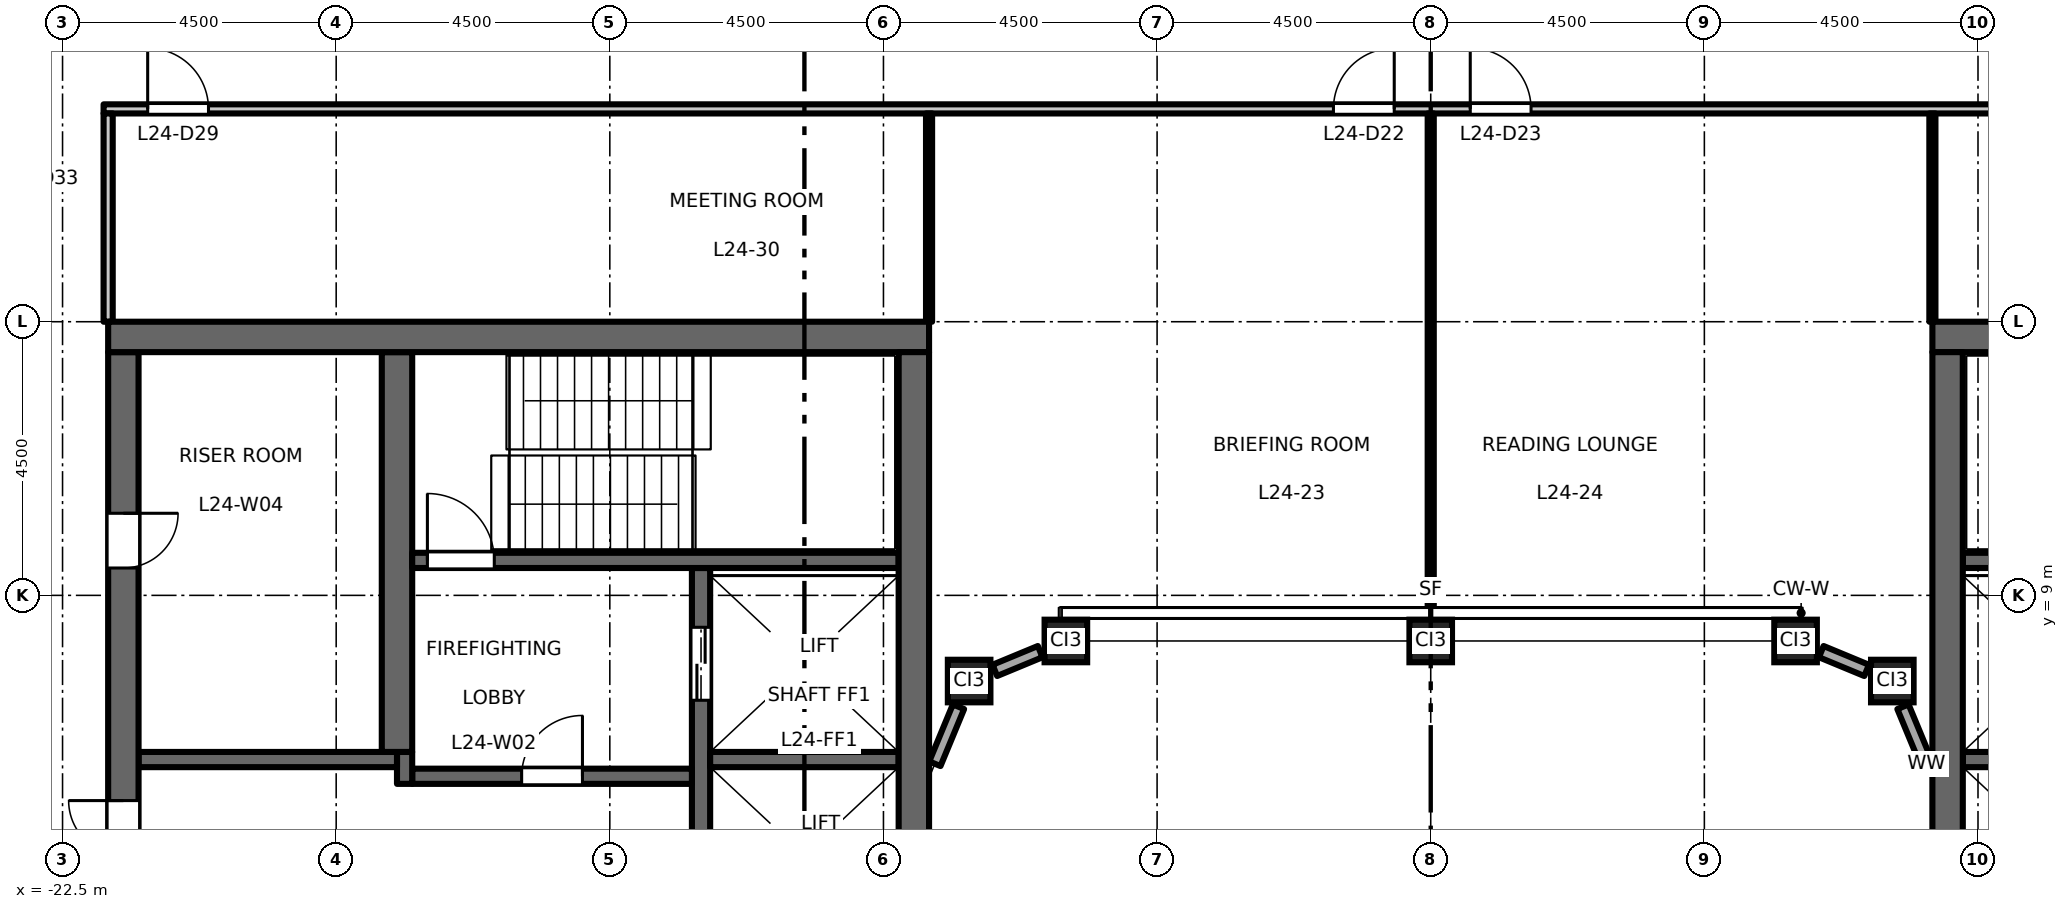
"""IFC4 building model, lengths in metres.
Left out: names, types, materials, properties, quantities, classifications, styles, units other than length and angle.
Written with IfcOpenShell. Run it as: python <this file> out.ifc"""

import sys

from ifc_helpers import new_model, si_unit, direction, frame, frame_2d, origin, origin_2d, place, context, subcontext, project, spatial, rectangle, hollow_rectangle, extrude, element, fill, save


model = new_model("IFC4")
c1 = context("Model", 3, precision=1e-05, world=origin(), true_north=direction((0.0, 1.0)))
c2 = subcontext(c1, "Body", "Model", "MODEL_VIEW")
j1 = project(units=[si_unit("LENGTHUNIT", "METRE"), si_unit("PLANEANGLEUNIT", "RADIAN")], contexts=[c1])
p1 = place(None, origin())
s1 = spatial("IfcSite", under=j1, at=p1, CompositionType="ELEMENT")
p2 = place(p1, origin())
s2 = spatial("IfcBuilding", under=s1, at=p2, CompositionType="ELEMENT")
p3 = place(p2, frame((0.0, 0.0, 113.7)))
s3 = spatial("IfcBuildingStorey", under=s2, at=p3, CompositionType="ELEMENT", Elevation=113.7)
for number, where, z_axis, x_axis in (
    (1, (-7.591, 7.591, 0.0), (0.0, 0.0, 1.0), (1.0, 0.0, 0.0)),
    (2, (-6.0, 8.25, 0.0), (0.0, 0.0, 1.0), (1.0, 0.0, 0.0)),
    (3, (0.0, 8.25, 0.0), (0.0, 0.0, 1.0), (1.0, 0.0, 0.0)),
    (4, (6.0, 8.25, 0.0), (0.0, 0.0, 1.0), (1.0, 0.0, 0.0)),
    (5, (7.591, 7.591, 0.0), (0.0, 0.0, 1.0), (1.0, 0.0, 0.0)),
):
    element("IfcColumn", number, at=place(p3, frame(where, z_axis=z_axis, x_axis=x_axis)), inside=s3, PredefinedType="COLUMN", context=c2, shape_type="SweptSolid", body=[
        extrude(hollow_rectangle(XDim=0.7, YDim=0.7, WallThickness=0.04, at=origin_2d()), origin(), (0.0, 0.0, 1.0), 4.5),
    ])
p4 = place(p3, frame((-12.0, -9.45, 0.0), z_axis=(0.0, 0.0, 1.0), x_axis=(0.0, 1.0, 0.0)))
e6 = element("IfcWall", 6, at=p4, inside=s3, PredefinedType="SHEAR", context=c2, shape_type="SweptSolid", body=[
    extrude(rectangle(XDim=18.9, YDim=0.3, at=frame_2d((9.45, 0.0))), origin(), (0.0, 0.0, 1.0), 4.35),
])
p5 = place(p4, frame((3.625, 0.0, 0.0)))
e7 = element("IfcOpeningElement", 7, at=p5, cuts=e6, PredefinedType="OPENING", context=c2, shape_type="SweptSolid", body=[
    extrude(rectangle(XDim=1.1, YDim=2.1, at=frame_2d((0.55, 1.05))), frame((0.0, 0.16, 0.0), z_axis=(0.0, -1.0, 0.0), x_axis=(1.0, 0.0, 0.0)), (0.0, 0.0, 1.0), 0.32),
])
p6 = place(p4, frame((6.775, 0.0, 0.0)))
e8 = element("IfcOpeningElement", 8, at=p6, cuts=e6, PredefinedType="OPENING", context=c2, shape_type="SweptSolid", body=[
    extrude(rectangle(XDim=1.1, YDim=2.1, at=frame_2d((0.55, 1.05))), frame((0.0, 0.16, 0.0), z_axis=(0.0, -1.0, 0.0), x_axis=(1.0, 0.0, 0.0)), (0.0, 0.0, 1.0), 0.32),
])
p7 = place(p4, frame((9.925, 0.0, 0.0)))
e9 = element("IfcOpeningElement", 9, at=p7, cuts=e6, PredefinedType="OPENING", context=c2, shape_type="SweptSolid", body=[
    extrude(rectangle(XDim=1.1, YDim=2.1, at=frame_2d((0.55, 1.05))), frame((0.0, 0.16, 0.0), z_axis=(0.0, -1.0, 0.0), x_axis=(1.0, 0.0, 0.0)), (0.0, 0.0, 1.0), 0.32),
])
p8 = place(p4, frame((13.075, 0.0, 0.0)))
e10 = element("IfcOpeningElement", 10, at=p8, cuts=e6, PredefinedType="OPENING", context=c2, shape_type="SweptSolid", body=[
    extrude(rectangle(XDim=1.1, YDim=2.1, at=frame_2d((0.55, 1.05))), frame((0.0, 0.16, 0.0), z_axis=(0.0, -1.0, 0.0), x_axis=(1.0, 0.0, 0.0)), (0.0, 0.0, 1.0), 0.32),
])
p9 = place(p4, frame((16.725, 0.0, 0.0)))
e11 = element("IfcOpeningElement", 11, at=p9, cuts=e6, PredefinedType="OPENING", context=c2, shape_type="SweptSolid", body=[
    extrude(rectangle(XDim=1.2, YDim=2.1, at=frame_2d((0.6, 1.05))), frame((0.0, 0.16, 0.0), z_axis=(0.0, -1.0, 0.0), x_axis=(1.0, 0.0, 0.0)), (0.0, 0.0, 1.0), 0.32),
])
p10 = place(p4, frame((0.975, 0.0, 0.0)))
e12 = element("IfcOpeningElement", 12, at=p10, cuts=e6, PredefinedType="OPENING", context=c2, shape_type="SweptSolid", body=[
    extrude(rectangle(XDim=1.2, YDim=2.1, at=frame_2d((0.6, 1.05))), frame((0.0, 0.16, 0.0), z_axis=(0.0, -1.0, 0.0), x_axis=(1.0, 0.0, 0.0)), (0.0, 0.0, 1.0), 0.32),
])
p11 = place(p3, frame((-12.15, 6.025, 0.0), z_axis=(0.0, 0.0, 1.0), x_axis=(-1.0, 0.0, 0.0)))
e13 = element("IfcWall", 13, at=p11, inside=s3, PredefinedType="SHEAR", context=c2, shape_type="SweptSolid", body=[
    extrude(rectangle(XDim=4.6, YDim=0.25, at=frame_2d((2.3, 0.0))), origin(), (0.0, 0.0, 1.0), 4.35),
])
p12 = place(p11, frame((1.8, 0.0, 0.0)))
e14 = element("IfcOpeningElement", 14, at=p12, cuts=e13, PredefinedType="OPENING", context=c2, shape_type="SweptSolid", body=[
    extrude(rectangle(XDim=1.0, YDim=2.1, at=frame_2d((0.5, 1.05))), frame((0.0, 0.135, 0.0), z_axis=(0.0, -1.0, 0.0), x_axis=(1.0, 0.0, 0.0)), (0.0, 0.0, 1.0), 0.27),
])
p13 = place(p3, frame((-16.875, 5.9, 0.0), z_axis=(0.0, 0.0, 1.0), x_axis=(0.0, 1.0, 0.0)))
e15 = element("IfcWall", 15, at=p13, inside=s3, PredefinedType="SHEAR", context=c2, shape_type="SweptSolid", body=[
    extrude(rectangle(XDim=0.525, YDim=0.25, at=frame_2d((0.263, 0.0))), origin(), (0.0, 0.0, 1.0), 4.35),
])
p14 = place(p3, frame((-17.0, 6.3, 0.0), z_axis=(0.0, 0.0, 1.0), x_axis=(-1.0, 0.0, 0.0)))
e16 = element("IfcWall", 16, at=p14, inside=s3, PredefinedType="SHEAR", context=c2, shape_type="SweptSolid", body=[
    extrude(rectangle(XDim=4.25, YDim=0.25, at=frame_2d((2.125, 0.0))), origin(), (0.0, 0.0, 1.0), 4.35),
])
p15 = place(p3, frame((-21.5, -13.0, 0.0), z_axis=(0.0, 0.0, 1.0), x_axis=(0.0, 1.0, 0.0)))
e17 = element("IfcWall", 17, at=p15, inside=s3, PredefinedType="SHEAR", context=c2, shape_type="SweptSolid", body=[
    extrude(rectangle(XDim=26.0, YDim=0.5, at=frame_2d((13.0, 0.0))), origin(), (0.0, 0.0, 1.0), 4.35),
])
p16 = place(p15, frame((16.825, 0.0, 0.0)))
e18 = element("IfcOpeningElement", 18, at=p16, cuts=e17, PredefinedType="OPENING", context=c2, shape_type="SweptSolid", body=[
    extrude(rectangle(XDim=1.8, YDim=2.1, at=frame_2d((0.9, 1.05))), frame((0.0, 0.26, 0.0), z_axis=(0.0, -1.0, 0.0), x_axis=(1.0, 0.0, 0.0)), (0.0, 0.0, 1.0), 0.52),
])
p17 = place(p15, frame((7.375, 0.0, 0.0)))
e19 = element("IfcOpeningElement", 19, at=p17, cuts=e17, PredefinedType="OPENING", context=c2, shape_type="SweptSolid", body=[
    extrude(rectangle(XDim=1.8, YDim=2.1, at=frame_2d((0.9, 1.05))), frame((0.0, 0.26, 0.0), z_axis=(0.0, -1.0, 0.0), x_axis=(1.0, 0.0, 0.0)), (0.0, 0.0, 1.0), 0.52),
])
p18 = place(p15, frame((22.45, 0.0, 0.0)))
e20 = element("IfcOpeningElement", 20, at=p18, cuts=e17, PredefinedType="OPENING", context=c2, shape_type="SweptSolid", body=[
    extrude(rectangle(XDim=0.9, YDim=2.1, at=frame_2d((0.45, 1.05))), frame((0.0, 0.26, 0.0), z_axis=(0.0, -1.0, 0.0), x_axis=(1.0, 0.0, 0.0)), (0.0, 0.0, 1.0), 0.52),
])
p19 = place(p15, frame((1.7, 0.0, 0.0)))
e21 = element("IfcOpeningElement", 21, at=p19, cuts=e17, PredefinedType="OPENING", context=c2, shape_type="SweptSolid", body=[
    extrude(rectangle(XDim=0.9, YDim=2.1, at=frame_2d((0.45, 1.05))), frame((0.0, 0.26, 0.0), z_axis=(0.0, -1.0, 0.0), x_axis=(1.0, 0.0, 0.0)), (0.0, 0.0, 1.0), 0.52),
])
p20 = place(p3, frame((-17.0, 6.425, 0.0), z_axis=(0.0, 0.0, 1.0), x_axis=(0.0, 1.0, 0.0)))
e22 = element("IfcWall", 22, at=p20, inside=s3, PredefinedType="SHEAR", context=c2, shape_type="SweptSolid", body=[
    extrude(rectangle(XDim=6.575, YDim=0.5, at=frame_2d((3.288, 0.0))), origin(), (0.0, 0.0, 1.0), 4.35),
])
p21 = place(p3, frame((-8.75, 6.3, 0.0), z_axis=(0.0, 0.0, 1.0), x_axis=(-1.0, 0.0, 0.0)))
e23 = element("IfcWall", 23, at=p21, inside=s3, PredefinedType="SHEAR", context=c2, shape_type="SweptSolid", body=[
    extrude(rectangle(XDim=3.1, YDim=0.25, at=frame_2d((1.55, 0.0))), origin(), (0.0, 0.0, 1.0), 4.35),
])
p22 = place(p3, frame((-8.75, 9.575, 0.0), z_axis=(0.0, 0.0, 1.0), x_axis=(-1.0, 0.0, 0.0)))
e24 = element("IfcWall", 24, at=p22, inside=s3, PredefinedType="SHEAR", context=c2, shape_type="SweptSolid", body=[
    extrude(rectangle(XDim=8.0, YDim=0.25, at=frame_2d((4.0, 0.0))), origin(), (0.0, 0.0, 1.0), 4.35),
])
p23 = place(p22, frame((6.65, 0.0, 0.0)))
e25 = element("IfcOpeningElement", 25, at=p23, cuts=e24, PredefinedType="OPENING", context=c2, shape_type="SweptSolid", body=[
    extrude(rectangle(XDim=1.1, YDim=2.1, at=frame_2d((0.55, 1.05))), frame((0.0, 0.135, 0.0), z_axis=(0.0, -1.0, 0.0), x_axis=(1.0, 0.0, 0.0)), (0.0, 0.0, 1.0), 0.27),
])
p24 = place(p3, frame((-8.25, 13.25, 0.0), z_axis=(0.0, 0.0, 1.0), x_axis=(-1.0, 0.0, 0.0)))
e26 = element("IfcWall", 26, at=p24, inside=s3, PredefinedType="SHEAR", context=c2, shape_type="SweptSolid", body=[
    extrude(rectangle(XDim=13.5, YDim=0.5, at=frame_2d((6.75, 0.0))), origin(), (0.0, 0.0, 1.0), 4.35),
])
p25 = place(p3, frame((-8.5, -13.0, 0.0), z_axis=(0.0, 0.0, 1.0), x_axis=(0.0, 1.0, 0.0)))
e27 = element("IfcWall", 27, at=p25, inside=s3, PredefinedType="SHEAR", context=c2, shape_type="SweptSolid", body=[
    extrude(rectangle(XDim=26.0, YDim=0.5, at=frame_2d((13.0, 0.0))), origin(), (0.0, 0.0, 1.0), 4.35),
])
p26 = place(p3, frame((8.75, 6.3, 0.0), z_axis=(0.0, 0.0, 1.0), x_axis=(1.0, 0.0, 0.0)))
e28 = element("IfcWall", 28, at=p26, inside=s3, PredefinedType="SHEAR", context=c2, shape_type="SweptSolid", body=[
    extrude(rectangle(XDim=3.1, YDim=0.25, at=frame_2d((1.55, 0.0))), origin(), (0.0, 0.0, 1.0), 4.35),
])
p27 = place(p3, frame((8.75, 9.575, 0.0), z_axis=(0.0, 0.0, 1.0), x_axis=(1.0, 0.0, 0.0)))
e29 = element("IfcWall", 29, at=p27, inside=s3, PredefinedType="SHEAR", context=c2, shape_type="SweptSolid", body=[
    extrude(rectangle(XDim=8.0, YDim=0.25, at=frame_2d((4.0, 0.0))), origin(), (0.0, 0.0, 1.0), 4.35),
])
p28 = place(p27, frame((6.65, 0.0, 0.0)))
e30 = element("IfcOpeningElement", 30, at=p28, cuts=e29, PredefinedType="OPENING", context=c2, shape_type="SweptSolid", body=[
    extrude(rectangle(XDim=1.1, YDim=2.1, at=frame_2d((0.55, 1.05))), frame((0.0, 0.135, 0.0), z_axis=(0.0, -1.0, 0.0), x_axis=(1.0, 0.0, 0.0)), (0.0, 0.0, 1.0), 0.27),
])
p29 = place(p3, frame((8.25, 13.25, 0.0), z_axis=(0.0, 0.0, 1.0), x_axis=(1.0, 0.0, 0.0)))
e31 = element("IfcWall", 31, at=p29, inside=s3, PredefinedType="SHEAR", context=c2, shape_type="SweptSolid", body=[
    extrude(rectangle(XDim=13.5, YDim=0.5, at=frame_2d((6.75, 0.0))), origin(), (0.0, 0.0, 1.0), 4.35),
])
p30 = place(p3, frame((8.5, -13.0, 0.0), z_axis=(0.0, 0.0, 1.0), x_axis=(0.0, 1.0, 0.0)))
e32 = element("IfcWall", 32, at=p30, inside=s3, PredefinedType="SHEAR", context=c2, shape_type="SweptSolid", body=[
    extrude(rectangle(XDim=26.0, YDim=0.5, at=frame_2d((13.0, 0.0))), origin(), (0.0, 0.0, 1.0), 4.35),
])
p31 = place(p3, frame((8.154, 6.231, 0.0), z_axis=(0.0, 0.0, 1.0), x_axis=(-0.382769662028, 0.923843810301, 0.0)))
e33 = element("IfcWall", 33, at=p31, inside=s3, PredefinedType="STANDARD", context=c2, shape_type="SweptSolid", body=[
    extrude(rectangle(XDim=1.015, YDim=0.2, at=frame_2d((0.507, 0.0))), origin(), (0.0, 0.0, 1.0), 3.826),
])
for number, where, z_axis, x_axis in (
    (34, (7.168, 7.766, 0.0), (0.0, 0.0, 1.0), (-0.924, 0.383, 0.0)),
    (35, (-6.423, 8.075, 0.0), (0.0, 0.0, 1.0), (-0.924, -0.383, 0.0)),
):
    element("IfcWall", number, at=place(p3, frame(where, z_axis=z_axis, x_axis=x_axis)), inside=s3, PredefinedType="STANDARD", context=c2, shape_type="SweptSolid", body=[
        extrude(rectangle(XDim=0.807, YDim=0.2, at=frame_2d((0.404, 0.0))), origin(), (0.0, 0.0, 1.0), 3.826),
    ])
p32 = place(p3, frame((-7.766, 7.168, 0.0), z_axis=(0.0, 0.0, 1.0), x_axis=(-0.382769662028, -0.923843810301, 0.0)))
e36 = element("IfcWall", 36, at=p32, inside=s3, PredefinedType="STANDARD", context=c2, shape_type="SweptSolid", body=[
    extrude(rectangle(XDim=1.015, YDim=0.2, at=frame_2d((0.507, 0.0))), origin(), (0.0, 0.0, 1.0), 3.826),
])
p33 = place(p3, frame((-21.825, 17.0, 0.0), z_axis=(0.0, 0.0, 1.0), x_axis=(1.0, 0.0, 0.0)))
e37 = element("IfcWall", 37, at=p33, inside=s3, PredefinedType="PARTITIONING", context=c2, shape_type="SweptSolid", body=[
    extrude(rectangle(XDim=43.65, YDim=0.15, at=frame_2d((21.825, 0.0))), origin(), (0.0, 0.0, 1.0), 4.35),
])
p34 = place(p33, frame((20.225, 0.0, 0.0)))
e38 = element("IfcOpeningElement", 38, at=p34, cuts=e37, PredefinedType="OPENING", context=c2, shape_type="SweptSolid", body=[
    extrude(rectangle(XDim=1.0, YDim=2.1, at=frame_2d((0.5, 1.05))), frame((0.0, 0.085, 0.0), z_axis=(0.0, -1.0, 0.0), x_axis=(1.0, 0.0, 0.0)), (0.0, 0.0, 1.0), 0.17),
])
p35 = place(p33, frame((22.475, 0.0, 0.0)))
e39 = element("IfcOpeningElement", 39, at=p35, cuts=e37, PredefinedType="OPENING", context=c2, shape_type="SweptSolid", body=[
    extrude(rectangle(XDim=1.0, YDim=2.1, at=frame_2d((0.5, 1.05))), frame((0.0, 0.085, 0.0), z_axis=(0.0, -1.0, 0.0), x_axis=(1.0, 0.0, 0.0)), (0.0, 0.0, 1.0), 0.17),
])
p36 = place(p33, frame((0.725, 0.0, 0.0)))
e40 = element("IfcOpeningElement", 40, at=p36, cuts=e37, PredefinedType="OPENING", context=c2, shape_type="SweptSolid", body=[
    extrude(rectangle(XDim=1.0, YDim=2.1, at=frame_2d((0.5, 1.05))), frame((0.0, 0.085, 0.0), z_axis=(0.0, -1.0, 0.0), x_axis=(1.0, 0.0, 0.0)), (0.0, 0.0, 1.0), 0.17),
])
p37 = place(p33, frame((41.975, 0.0, 0.0)))
e41 = element("IfcOpeningElement", 41, at=p37, cuts=e37, PredefinedType="OPENING", context=c2, shape_type="SweptSolid", body=[
    extrude(rectangle(XDim=1.0, YDim=2.1, at=frame_2d((0.5, 1.05))), frame((0.0, 0.085, 0.0), z_axis=(0.0, -1.0, 0.0), x_axis=(1.0, 0.0, 0.0)), (0.0, 0.0, 1.0), 0.17),
])
p38 = place(p3, frame((-21.75, 13.5, 0.0), z_axis=(0.0, 0.0, 1.0), x_axis=(0.0, 1.0, 0.0)))
e42 = element("IfcWall", 42, at=p38, inside=s3, PredefinedType="PARTITIONING", context=c2, shape_type="SweptSolid", body=[
    extrude(rectangle(XDim=3.425, YDim=0.15, at=frame_2d((1.712, 0.0))), origin(), (0.0, 0.0, 1.0), 4.35),
])
p39 = place(p3, frame((-8.25, 13.5, 0.0), z_axis=(0.0, 0.0, 1.0), x_axis=(0.0, 1.0, 0.0)))
e43 = element("IfcWall", 43, at=p39, inside=s3, PredefinedType="PARTITIONING", context=c2, shape_type="SweptSolid", body=[
    extrude(rectangle(XDim=3.425, YDim=0.1, at=frame_2d((1.712, 0.0))), origin(), (0.0, 0.0, 1.0), 4.35),
])
p40 = place(p3, frame((0.0, 8.65, 0.0), z_axis=(0.0, 0.0, 1.0), x_axis=(0.0, 1.0, 0.0)))
e44 = element("IfcWall", 44, at=p40, inside=s3, PredefinedType="PARTITIONING", context=c2, shape_type="SweptSolid", body=[
    extrude(rectangle(XDim=8.275, YDim=0.1, at=frame_2d((4.138, 0.0))), origin(), (0.0, 0.0, 1.0), 3.45),
])
p41 = place(p3, frame((8.25, 13.5, 0.0), z_axis=(0.0, 0.0, 1.0), x_axis=(0.0, 1.0, 0.0)))
e45 = element("IfcWall", 45, at=p41, inside=s3, PredefinedType="PARTITIONING", context=c2, shape_type="SweptSolid", body=[
    extrude(rectangle(XDim=3.425, YDim=0.1, at=frame_2d((1.712, 0.0))), origin(), (0.0, 0.0, 1.0), 4.35),
])
p42 = place(p12, origin())
e46 = element("IfcDoor", 46, at=p42, inside=s3, OperationType="SINGLE_SWING_LEFT", PredefinedType="DOOR", context=c2, shape_type="SweptSolid", body=[
    extrude(rectangle(XDim=1.0, YDim=2.1, at=frame_2d((0.5, 1.05))), frame((0.0, 0.025, 0.0), z_axis=(0.0, -1.0, 0.0), x_axis=(1.0, 0.0, 0.0)), (0.0, 0.0, 1.0), 0.05),
])
fill(e14, e46)
p43 = place(p23, origin())
e47 = element("IfcDoor", 47, at=p43, inside=s3, OperationType="SINGLE_SWING_RIGHT", PredefinedType="DOOR", context=c2, shape_type="SweptSolid", body=[
    extrude(rectangle(XDim=1.1, YDim=2.1, at=frame_2d((0.55, 1.05))), frame((0.0, 0.025, 0.0), z_axis=(0.0, -1.0, 0.0), x_axis=(1.0, 0.0, 0.0)), (0.0, 0.0, 1.0), 0.05),
])
fill(e25, e47)
p44 = place(p16, origin())
e48 = element("IfcDoor", 48, at=p44, inside=s3, OperationType="DOUBLE_DOOR_DOUBLE_SWING", PredefinedType="DOOR", context=c2, shape_type="SweptSolid", body=[
    extrude(rectangle(XDim=1.8, YDim=2.1, at=frame_2d((0.9, 1.05))), frame((0.0, 0.025, 0.0), z_axis=(0.0, -1.0, 0.0), x_axis=(1.0, 0.0, 0.0)), (0.0, 0.0, 1.0), 0.05),
])
fill(e18, e48)
p45 = place(p9, origin())
e49 = element("IfcDoor", 49, at=p45, inside=s3, OperationType="DOUBLE_DOOR_SLIDING", PredefinedType="DOOR", context=c2, shape_type="SweptSolid", body=[
    extrude(rectangle(XDim=1.2, YDim=2.1, at=frame_2d((0.6, 1.05))), frame((0.0, 0.025, 0.0), z_axis=(0.0, -1.0, 0.0), x_axis=(1.0, 0.0, 0.0)), (0.0, 0.0, 1.0), 0.05),
])
fill(e11, e49)
p46 = place(p18, origin())
e50 = element("IfcDoor", 50, at=p46, inside=s3, OperationType="SINGLE_SWING_RIGHT", PredefinedType="DOOR", context=c2, shape_type="SweptSolid", body=[
    extrude(rectangle(XDim=0.9, YDim=2.1, at=frame_2d((0.45, 1.05))), frame((0.0, 0.025, 0.0), z_axis=(0.0, -1.0, 0.0), x_axis=(1.0, 0.0, 0.0)), (0.0, 0.0, 1.0), 0.05),
])
fill(e20, e50)
p47 = place(p34, origin())
e51 = element("IfcDoor", 51, at=p47, inside=s3, OperationType="SINGLE_SWING_RIGHT", PredefinedType="DOOR", context=c2, shape_type="SweptSolid", body=[
    extrude(rectangle(XDim=1.0, YDim=2.1, at=frame_2d((0.5, 1.05))), frame((0.0, 0.025, 0.0), z_axis=(0.0, -1.0, 0.0), x_axis=(1.0, 0.0, 0.0)), (0.0, 0.0, 1.0), 0.05),
])
fill(e38, e51)
p48 = place(p35, origin())
e52 = element("IfcDoor", 52, at=p48, inside=s3, OperationType="SINGLE_SWING_LEFT", PredefinedType="DOOR", context=c2, shape_type="SweptSolid", body=[
    extrude(rectangle(XDim=1.0, YDim=2.1, at=frame_2d((0.5, 1.05))), frame((0.0, 0.025, 0.0), z_axis=(0.0, -1.0, 0.0), x_axis=(1.0, 0.0, 0.0)), (0.0, 0.0, 1.0), 0.05),
])
fill(e39, e52)
p49 = place(p36, origin())
e53 = element("IfcDoor", 53, at=p49, inside=s3, OperationType="SINGLE_SWING_LEFT", PredefinedType="DOOR", context=c2, shape_type="SweptSolid", body=[
    extrude(rectangle(XDim=1.0, YDim=2.1, at=frame_2d((0.5, 1.05))), frame((0.0, 0.025, 0.0), z_axis=(0.0, -1.0, 0.0), x_axis=(1.0, 0.0, 0.0)), (0.0, 0.0, 1.0), 0.05),
])
fill(e40, e53)
save(model, sys.argv[1])
